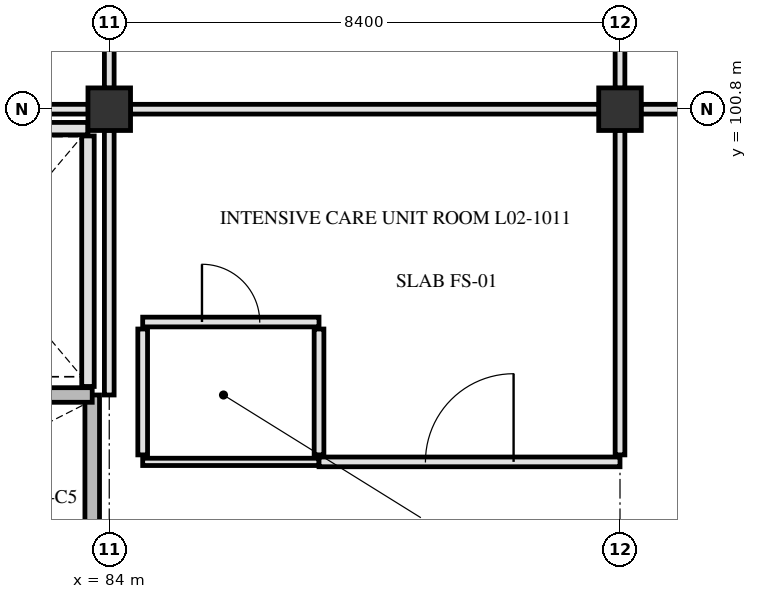
"""IFC4 building model, lengths in metres.
Left out: names, types, materials, properties, quantities, classifications, styles, units other than length and angle.
Written with IfcOpenShell. Run it as: python <this file> out.ifc"""

import sys

from ifc_helpers import new_model, si_unit, direction, frame, frame_2d, origin, origin_2d, place, context, subcontext, project, spatial, rectangle, extrude, element, fill, save


model = new_model("IFC4")
c1 = context("Model", 3, precision=1e-05, world=origin(), true_north=direction((0.0, 1.0)))
c2 = subcontext(c1, "Body", "Model", "MODEL_VIEW")
j1 = project(units=[si_unit("LENGTHUNIT", "METRE"), si_unit("PLANEANGLEUNIT", "RADIAN")], contexts=[c1])
p1 = place(None, origin())
s1 = spatial("IfcSite", under=j1, at=p1, CompositionType="ELEMENT")
p2 = place(p1, origin())
s2 = spatial("IfcBuilding", under=s1, at=p2, CompositionType="ELEMENT")
p3 = place(p2, frame((0.0, 0.0, 9.3)))
s3 = spatial("IfcBuildingStorey", under=s2, at=p3, CompositionType="ELEMENT", Elevation=9.3)
for number, where, z_axis, x_axis in (
    (1, (84.0, 100.8, 0.0), (0.0, 0.0, 1.0), (1.0, 0.0, 0.0)),
    (2, (92.4, 100.8, 0.0), (0.0, 0.0, 1.0), (1.0, 0.0, 0.0)),
):
    element("IfcColumn", number, at=place(p3, frame(where, z_axis=z_axis, x_axis=x_axis)), inside=s3, PredefinedType="COLUMN", context=c2, shape_type="SweptSolid", body=[
        extrude(rectangle(XDim=0.7, YDim=0.7, at=origin_2d()), origin(), (0.0, 0.0, 1.0), 5.1),
    ])
p4 = place(p3, frame((83.72, 92.78, 0.0), z_axis=(0.0, 0.0, 1.0), x_axis=(0.0, 1.0, 0.0)))
e3 = element("IfcWall", 3, at=p4, inside=s3, PredefinedType="SHEAR", context=c2, shape_type="SweptSolid", body=[
    extrude(rectangle(XDim=3.32, YDim=0.24, at=frame_2d((1.66, 0.0))), origin(), (0.0, 0.0, 1.0), 4.78),
])
p5 = place(p3, frame((75.9, 96.1, 0.0), z_axis=(0.0, 0.0, 1.0), x_axis=(1.0, 0.0, 0.0)))
e4 = element("IfcWall", 4, at=p5, inside=s3, PredefinedType="SHEAR", context=c2, shape_type="SweptSolid", body=[
    extrude(rectangle(XDim=7.82, YDim=0.24, at=frame_2d((3.91, 0.0))), origin(), (0.0, 0.0, 1.0), 4.78),
])
p6 = place(p5, frame((0.25, 0.0, 0.0)))
e5 = element("IfcOpeningElement", 5, at=p6, cuts=e4, PredefinedType="OPENING", context=c2, shape_type="SweptSolid", body=[
    extrude(rectangle(XDim=1.45, YDim=2.2, at=frame_2d((0.725, 1.1))), frame((0.0, 0.13, 0.0), z_axis=(0.0, -1.0, 0.0), x_axis=(1.0, 0.0, 0.0)), (0.0, 0.0, 1.0), 0.26),
])
p7 = place(p3, frame((83.65, 96.24, 0.0), z_axis=(0.0, 0.0, 1.0), x_axis=(0.0, 1.0, 0.0)))
e6 = element("IfcWall", 6, at=p7, inside=s3, PredefinedType="PARTITIONING", context=c2, shape_type="SweptSolid", body=[
    extrude(rectangle(XDim=4.12, YDim=0.205, at=frame_2d((2.06, 0.0))), origin(), (0.0, 0.0, 1.0), 4.77),
])
p8 = place(p3, frame((80.08, 100.48, 0.0), z_axis=(0.0, 0.0, 1.0), x_axis=(1.0, 0.0, 0.0)))
e7 = element("IfcWall", 7, at=p8, inside=s3, PredefinedType="PARTITIONING", context=c2, shape_type="SweptSolid", body=[
    extrude(rectangle(XDim=3.57, YDim=0.205, at=frame_2d((1.785, 0.0))), origin(), (0.0, 0.0, 1.0), 4.17),
])
p9 = place(p3, frame((84.55, 95.0, 0.0), z_axis=(0.0, 0.0, 1.0), x_axis=(1.0, 0.0, 0.0)))
e8 = element("IfcWall", 8, at=p9, inside=s3, PredefinedType="PARTITIONING", context=c2, shape_type="SweptSolid", body=[
    extrude(rectangle(XDim=2.9, YDim=0.12, at=frame_2d((1.45, 0.0))), origin(), (0.0, 0.0, 1.0), 4.77),
])
p10 = place(p3, frame((87.45, 95.0, 0.0), z_axis=(0.0, 0.0, 1.0), x_axis=(1.0, 0.0, 0.0)))
e9 = element("IfcWall", 9, at=p10, inside=s3, PredefinedType="PARTITIONING", context=c2, shape_type="SweptSolid", body=[
    extrude(rectangle(XDim=4.95, YDim=0.16, at=frame_2d((2.475, 0.0))), origin(), (0.0, 0.0, 1.0), 4.17),
])
p11 = place(p10, frame((1.75, 0.0, 0.0)))
e10 = element("IfcOpeningElement", 10, at=p11, cuts=e9, PredefinedType="OPENING", context=c2, shape_type="SweptSolid", body=[
    extrude(rectangle(XDim=1.45, YDim=2.2, at=frame_2d((0.725, 1.1))), frame((0.0, 0.09, 0.0), z_axis=(0.0, -1.0, 0.0), x_axis=(1.0, 0.0, 0.0)), (0.0, 0.0, 1.0), 0.18),
])
p12 = place(p3, frame((84.55, 97.3, 0.0), z_axis=(0.0, 0.0, 1.0), x_axis=(1.0, 0.0, 0.0)))
e11 = element("IfcWall", 11, at=p12, inside=s3, PredefinedType="PARTITIONING", context=c2, shape_type="SweptSolid", body=[
    extrude(rectangle(XDim=2.9, YDim=0.16, at=frame_2d((1.45, 0.0))), origin(), (0.0, 0.0, 1.0), 4.77),
])
p13 = place(p12, frame((0.975, 0.0, 0.0)))
e12 = element("IfcOpeningElement", 12, at=p13, cuts=e11, PredefinedType="OPENING", context=c2, shape_type="SweptSolid", body=[
    extrude(rectangle(XDim=0.95, YDim=2.1, at=frame_2d((0.475, 1.05))), frame((0.0, 0.09, 0.0), z_axis=(0.0, -1.0, 0.0), x_axis=(1.0, 0.0, 0.0)), (0.0, 0.0, 1.0), 0.18),
])
p14 = place(p3, frame((78.95, 100.8, 0.0), z_axis=(0.0, 0.0, 1.0), x_axis=(1.0, 0.0, 0.0)))
e13 = element("IfcWall", 13, at=p14, inside=s3, PredefinedType="PARTITIONING", context=c2, shape_type="SweptSolid", body=[
    extrude(rectangle(XDim=4.705, YDim=0.16, at=frame_2d((2.353, 0.0))), origin(), (0.0, 0.0, 1.0), 4.17),
])
p15 = place(p3, frame((84.345, 100.8, 0.0), z_axis=(0.0, 0.0, 1.0), x_axis=(1.0, 0.0, 0.0)))
e14 = element("IfcWall", 14, at=p15, inside=s3, PredefinedType="PARTITIONING", context=c2, shape_type="SweptSolid", body=[
    extrude(rectangle(XDim=7.71, YDim=0.16, at=frame_2d((3.855, 0.0))), origin(), (0.0, 0.0, 1.0), 4.17),
])
p16 = place(p3, frame((92.745, 100.8, 0.0), z_axis=(0.0, 0.0, 1.0), x_axis=(1.0, 0.0, 0.0)))
e15 = element("IfcWall", 15, at=p16, inside=s3, PredefinedType="PARTITIONING", context=c2, shape_type="SweptSolid", body=[
    extrude(rectangle(XDim=5.455, YDim=0.16, at=frame_2d((2.728, 0.0))), origin(), (0.0, 0.0, 1.0), 4.17),
])
p17 = place(p16, frame((1.988, 0.0, 0.0)))
e16 = element("IfcOpeningElement", 16, at=p17, cuts=e15, PredefinedType="OPENING", context=c2, shape_type="SweptSolid", body=[
    extrude(rectangle(XDim=1.48, YDim=2.22, at=frame_2d((0.74, 1.11))), frame((0.0, 0.09, 0.0), z_axis=(0.0, -1.0, 0.0), x_axis=(1.0, 0.0, 0.0)), (0.0, 0.0, 1.0), 0.18),
])
p18 = place(p3, frame((84.0, 96.1, 0.0), z_axis=(0.0, 0.0, 1.0), x_axis=(0.0, 1.0, 0.0)))
e17 = element("IfcWall", 17, at=p18, inside=s3, PredefinedType="PARTITIONING", context=c2, shape_type="SweptSolid", body=[
    extrude(rectangle(XDim=4.355, YDim=0.16, at=frame_2d((2.177, 0.0))), origin(), (0.0, 0.0, 1.0), 4.17),
])
p19 = place(p3, frame((84.0, 101.145, 0.0), z_axis=(0.0, 0.0, 1.0), x_axis=(0.0, 1.0, 0.0)))
e18 = element("IfcWall", 18, at=p19, inside=s3, PredefinedType="PARTITIONING", context=c2, shape_type="SweptSolid", body=[
    extrude(rectangle(XDim=5.34, YDim=0.16, at=frame_2d((2.67, 0.0))), origin(), (0.0, 0.0, 1.0), 4.17),
])
for number, where, z_axis, x_axis in (
    (19, (84.55, 95.115, 0.0), (0.0, 0.0, 1.0), (0.0, 1.0, 0.0)),
    (20, (87.45, 95.115, 0.0), (0.0, 0.0, 1.0), (0.0, 1.0, 0.0)),
):
    element("IfcWall", number, at=place(p3, frame(where, z_axis=z_axis, x_axis=x_axis)), inside=s3, PredefinedType="PARTITIONING", context=c2, shape_type="SweptSolid", body=[
        extrude(rectangle(XDim=2.07, YDim=0.16, at=frame_2d((1.035, 0.0))), origin(), (0.0, 0.0, 1.0), 4.77),
    ])
for number, where, z_axis, x_axis in (
    (21, (92.4, 95.115, 0.0), (0.0, 0.0, 1.0), (0.0, 1.0, 0.0)),
    (22, (92.4, 101.145, 0.0), (0.0, 0.0, 1.0), (0.0, 1.0, 0.0)),
):
    element("IfcWall", number, at=place(p3, frame(where, z_axis=z_axis, x_axis=x_axis)), inside=s3, PredefinedType="PARTITIONING", context=c2, shape_type="SweptSolid", body=[
        extrude(rectangle(XDim=5.34, YDim=0.16, at=frame_2d((2.67, 0.0))), origin(), (0.0, 0.0, 1.0), 4.17),
    ])
p20 = place(p11, origin())
e23 = element("IfcDoor", 23, at=p20, inside=s3, OperationType="SINGLE_SWING_RIGHT", PredefinedType="DOOR", context=c2, shape_type="SweptSolid", body=[
    extrude(rectangle(XDim=1.45, YDim=2.2, at=frame_2d((0.725, 1.1))), frame((0.0, 0.025, 0.0), z_axis=(0.0, -1.0, 0.0), x_axis=(1.0, 0.0, 0.0)), (0.0, 0.0, 1.0), 0.05),
])
fill(e10, e23)
p21 = place(p13, origin())
e24 = element("IfcDoor", 24, at=p21, inside=s3, OperationType="SINGLE_SWING_LEFT", PredefinedType="DOOR", context=c2, shape_type="SweptSolid", body=[
    extrude(rectangle(XDim=0.95, YDim=2.1, at=frame_2d((0.475, 1.05))), frame((0.0, 0.025, 0.0), z_axis=(0.0, -1.0, 0.0), x_axis=(1.0, 0.0, 0.0)), (0.0, 0.0, 1.0), 0.05),
])
fill(e12, e24)
save(model, sys.argv[1])
